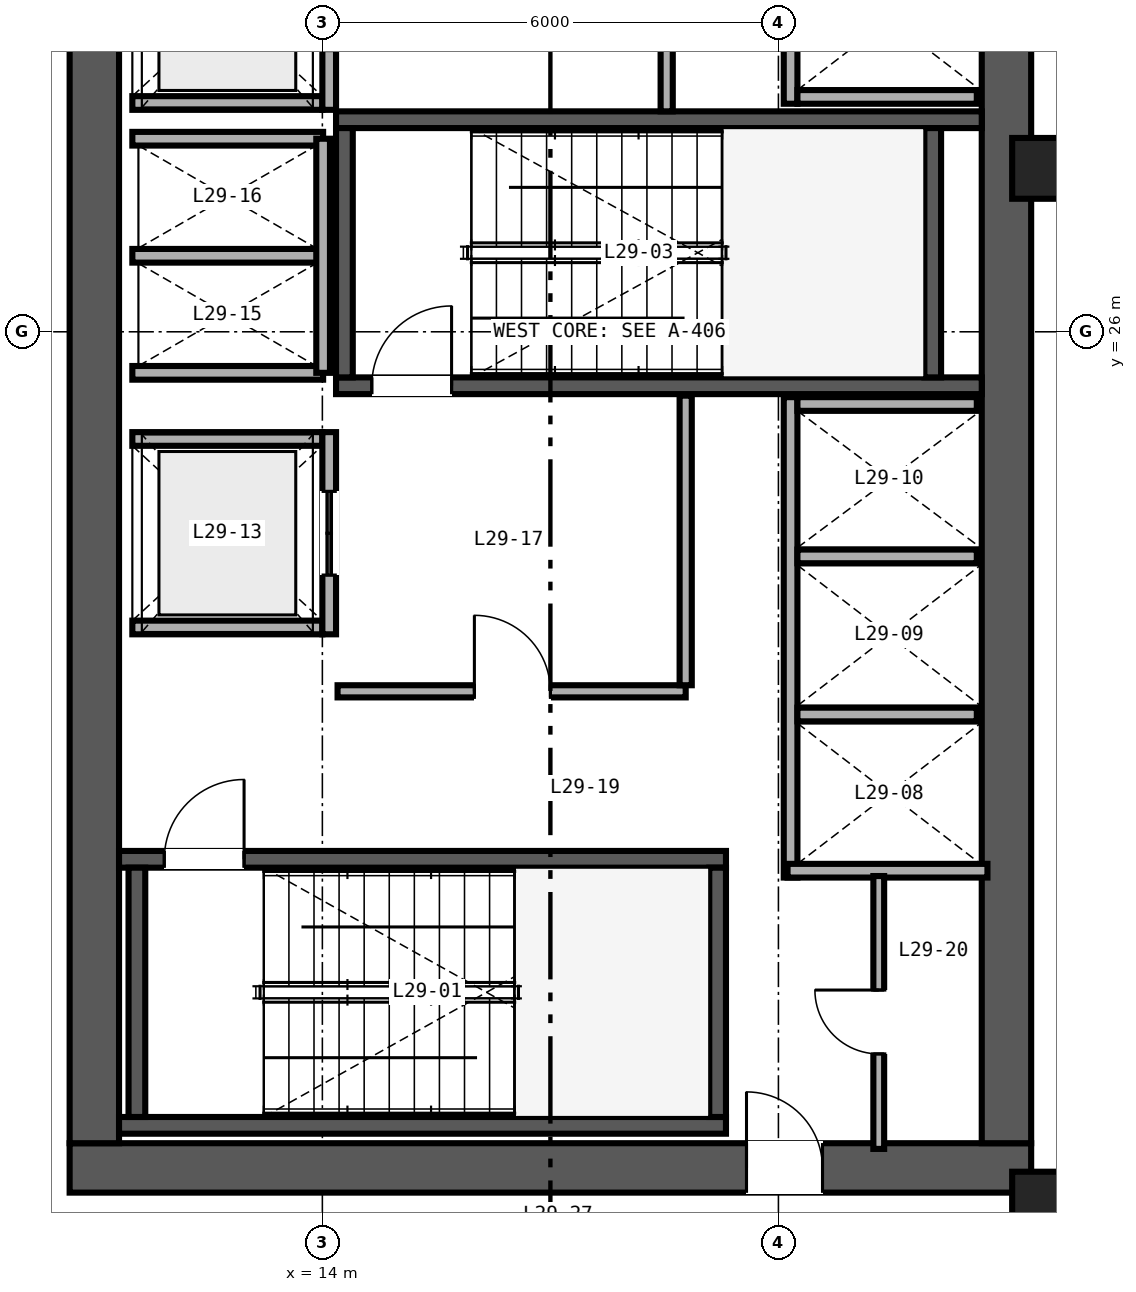
"""IFC4 building model, lengths in metres.
Left out: names, types, materials, properties, quantities, classifications, styles, units other than length and angle.
Written with IfcOpenShell. Run it as: python <this file> out.ifc"""

import sys

from ifc_helpers import new_model, si_unit, direction, frame, frame_2d, origin, origin_2d, place, context, subcontext, project, spatial, rectangle, hollow_rectangle, extrude, source, transform, mapped, element, fill, save


model = new_model("IFC4")
c1 = context("Model", 3, precision=1e-05, world=origin(), true_north=direction((0.0, 1.0)))
c2 = subcontext(c1, "Body", "Model", "MODEL_VIEW")
j1 = project(units=[si_unit("LENGTHUNIT", "METRE"), si_unit("PLANEANGLEUNIT", "RADIAN")], contexts=[c1])
p1 = place(None, origin())
s1 = spatial("IfcSite", under=j1, at=p1, CompositionType="ELEMENT")
p2 = place(p1, origin())
s2 = spatial("IfcBuilding", under=s1, at=p2, CompositionType="ELEMENT")
p3 = place(p2, frame((0.0, 0.0, 118.8)))
s3 = spatial("IfcBuildingStorey", under=s2, at=p3, CompositionType="ELEMENT", Elevation=118.8)
p4 = place(p3, frame((10.675, 15.0, 0.0), z_axis=(0.0, 0.0, 1.0), x_axis=(1.0, 0.0, 0.0)))
e1 = element("IfcWall", 1, at=p4, inside=s3, PredefinedType="SHEAR", context=c2, shape_type="SweptSolid", body=[
    extrude(rectangle(XDim=12.65, YDim=0.65, at=frame_2d((6.325, 0.0))), origin(), (0.0, 0.0, 1.0), 3.36),
])
p5 = place(p4, frame((8.905, 0.0, 0.0)))
e2 = element("IfcOpeningElement", 2, at=p5, cuts=e1, PredefinedType="OPENING", context=c2, shape_type="SweptSolid", body=[
    extrude(rectangle(XDim=1.0, YDim=2.15, at=frame_2d((0.5, 1.075))), frame((0.0, 0.335, 0.0), z_axis=(0.0, -1.0, 0.0), x_axis=(1.0, 0.0, 0.0)), (0.0, 0.0, 1.0), 0.67),
])
for number, where, z_axis, x_axis in (
    (3, (11.0, 15.325, 0.0), (0.0, 0.0, 1.0), (0.0, 1.0, 0.0)),
    (4, (23.0, 15.325, 0.0), (0.0, 0.0, 1.0), (0.0, 1.0, 0.0)),
):
    element("IfcWall", number, at=place(p3, frame(where, z_axis=z_axis, x_axis=x_axis)), inside=s3, PredefinedType="SHEAR", context=c2, shape_type="SweptSolid", body=[
        extrude(rectangle(XDim=21.35, YDim=0.65, at=frame_2d((10.675, 0.0))), origin(), (0.0, 0.0, 1.0), 3.36),
    ])
p6 = place(p3, frame((11.325, 15.56, 0.0), z_axis=(0.0, 0.0, 1.0), x_axis=(1.0, 0.0, 0.0)))
e5 = element("IfcWall", 5, at=p6, inside=s3, PredefinedType="SHEAR", context=c2, shape_type="SweptSolid", body=[
    extrude(rectangle(XDim=7.985, YDim=0.22, at=frame_2d((3.993, 0.0))), origin(), (0.0, 0.0, 1.0), 3.4),
])
p7 = place(p3, frame((11.325, 19.06, 0.0), z_axis=(0.0, 0.0, 1.0), x_axis=(1.0, 0.0, 0.0)))
e6 = element("IfcWall", 6, at=p7, inside=s3, PredefinedType="SHEAR", context=c2, shape_type="SweptSolid", body=[
    extrude(rectangle(XDim=7.985, YDim=0.22, at=frame_2d((3.993, 0.0))), origin(), (0.0, 0.0, 1.0), 3.4),
])
p8 = place(p7, frame((0.595, 0.0, 0.0)))
e7 = element("IfcOpeningElement", 7, at=p8, cuts=e6, PredefinedType="OPENING", context=c2, shape_type="SweptSolid", body=[
    extrude(rectangle(XDim=1.05, YDim=2.15, at=frame_2d((0.525, 1.075))), frame((0.0, 0.12, 0.0), z_axis=(0.0, -1.0, 0.0), x_axis=(1.0, 0.0, 0.0)), (0.0, 0.0, 1.0), 0.24),
])
for number, where, z_axis, x_axis in (
    (8, (11.56, 15.67, 0.0), (0.0, 0.0, 1.0), (0.0, 1.0, 0.0)),
    (9, (19.2, 15.67, 0.0), (0.0, 0.0, 1.0), (0.0, 1.0, 0.0)),
):
    element("IfcWall", number, at=place(p3, frame(where, z_axis=z_axis, x_axis=x_axis)), inside=s3, PredefinedType="SHEAR", context=c2, shape_type="SweptSolid", body=[
        extrude(rectangle(XDim=3.28, YDim=0.22, at=frame_2d((1.64, 0.0))), origin(), (0.0, 0.0, 1.0), 3.4),
    ])
p9 = place(p3, frame((14.18, 25.29, 0.0), z_axis=(0.0, 0.0, 1.0), x_axis=(1.0, 0.0, 0.0)))
e10 = element("IfcWall", 10, at=p9, inside=s3, PredefinedType="SHEAR", context=c2, shape_type="SweptSolid", body=[
    extrude(rectangle(XDim=8.495, YDim=0.22, at=frame_2d((4.248, 0.0))), origin(), (0.0, 0.0, 1.0), 3.4),
])
p10 = place(p9, frame((0.47, 0.0, 0.0)))
e11 = element("IfcOpeningElement", 11, at=p10, cuts=e10, PredefinedType="OPENING", context=c2, shape_type="SweptSolid", body=[
    extrude(rectangle(XDim=1.05, YDim=2.15, at=frame_2d((0.525, 1.075))), frame((0.0, 0.12, 0.0), z_axis=(0.0, -1.0, 0.0), x_axis=(1.0, 0.0, 0.0)), (0.0, 0.0, 1.0), 0.24),
])
p11 = place(p3, frame((14.18, 28.79, 0.0), z_axis=(0.0, 0.0, 1.0), x_axis=(1.0, 0.0, 0.0)))
e12 = element("IfcWall", 12, at=p11, inside=s3, PredefinedType="SHEAR", context=c2, shape_type="SweptSolid", body=[
    extrude(rectangle(XDim=8.495, YDim=0.22, at=frame_2d((4.248, 0.0))), origin(), (0.0, 0.0, 1.0), 3.4),
])
for number, where, z_axis, x_axis in (
    (13, (14.29, 25.4, 0.0), (0.0, 0.0, 1.0), (0.0, 1.0, 0.0)),
    (14, (22.03, 25.4, 0.0), (0.0, 0.0, 1.0), (0.0, 1.0, 0.0)),
):
    element("IfcWall", number, at=place(p3, frame(where, z_axis=z_axis, x_axis=x_axis)), inside=s3, PredefinedType="SHEAR", context=c2, shape_type="SweptSolid", body=[
        extrude(rectangle(XDim=3.28, YDim=0.22, at=frame_2d((1.64, 0.0))), origin(), (0.0, 0.0, 1.0), 3.4),
    ])
m1 = source(origin(), c2, "Body", "SweptSolid", [
    extrude(hollow_rectangle(XDim=0.85, YDim=0.8, WallThickness=0.032, at=origin_2d()), origin(), (0.0, 0.0, 1.0), 3.36),
])
for number, where, z_axis, x_axis in (
    (15, (23.5, 14.55, 0.0), (0.0, 0.0, 1.0), (1.0, 0.0, 0.0)),
    (16, (23.5, 28.15, 0.0), (0.0, 0.0, 1.0), (1.0, 0.0, 0.0)),
):
    element("IfcColumn", number, at=place(p3, frame(where, z_axis=z_axis, x_axis=x_axis)), inside=s3, PredefinedType="COLUMN", context=c2, shape_type="MappedRepresentation", body=[
        mapped(m1, transform((0.0, 0.0, 0.0), scale=1.0)),
    ])
p12 = place(p3, frame((20.16, 18.82, 0.0), z_axis=(0.0, 0.0, 1.0), x_axis=(0.0, 1.0, 0.0)))
e17 = element("IfcWall", 17, at=p12, inside=s3, PredefinedType="SOLIDWALL", context=c2, shape_type="SweptSolid", body=[
    extrude(rectangle(XDim=6.32, YDim=0.18, at=frame_2d((3.16, 0.0))), origin(), (0.0, 0.0, 1.0), 2.36),
])
p13 = place(p3, frame((20.12, 18.91, 0.0), z_axis=(0.0, 0.0, 1.0), x_axis=(1.0, 0.0, 0.0)))
e18 = element("IfcWall", 18, at=p13, inside=s3, PredefinedType="SOLIDWALL", context=c2, shape_type="SweptSolid", body=[
    extrude(rectangle(XDim=2.63, YDim=0.18, at=frame_2d((1.315, 0.0))), origin(), (0.0, 0.0, 1.0), 3.36),
])
p14 = place(p3, frame((20.25, 25.05, 0.0), z_axis=(0.0, 0.0, 1.0), x_axis=(1.0, 0.0, 0.0)))
e19 = element("IfcWall", 19, at=p14, inside=s3, PredefinedType="SOLIDWALL", context=c2, shape_type="SweptSolid", body=[
    extrude(rectangle(XDim=2.36, YDim=0.18, at=frame_2d((1.18, 0.0))), origin(), (0.0, 0.0, 1.0), 3.36),
])
p15 = place(p3, frame((20.25, 20.965, 0.0), z_axis=(0.0, 0.0, 1.0), x_axis=(1.0, 0.0, 0.0)))
e20 = element("IfcWall", 20, at=p15, inside=s3, PredefinedType="SOLIDWALL", context=c2, shape_type="SweptSolid", body=[
    extrude(rectangle(XDim=2.36, YDim=0.18, at=frame_2d((1.18, 0.0))), origin(), (0.0, 0.0, 1.0), 2.36),
])
p16 = place(p3, frame((20.25, 23.045, 0.0), z_axis=(0.0, 0.0, 1.0), x_axis=(1.0, 0.0, 0.0)))
e21 = element("IfcWall", 21, at=p16, inside=s3, PredefinedType="SOLIDWALL", context=c2, shape_type="SweptSolid", body=[
    extrude(rectangle(XDim=2.36, YDim=0.18, at=frame_2d((1.18, 0.0))), origin(), (0.0, 0.0, 1.0), 3.36),
])
p17 = place(p3, frame((20.16, 29.0, 0.0), z_axis=(0.0, 0.0, 1.0), x_axis=(0.0, 1.0, 0.0)))
e22 = element("IfcWall", 22, at=p17, inside=s3, PredefinedType="SOLIDWALL", context=c2, shape_type="SweptSolid", body=[
    extrude(rectangle(XDim=4.29, YDim=0.18, at=frame_2d((2.145, 0.0))), origin(), (0.0, 0.0, 1.0), 3.36),
])
p18 = place(p3, frame((20.25, 29.09, 0.0), z_axis=(0.0, 0.0, 1.0), x_axis=(1.0, 0.0, 0.0)))
e23 = element("IfcWall", 23, at=p18, inside=s3, PredefinedType="SOLIDWALL", context=c2, shape_type="SweptSolid", body=[
    extrude(rectangle(XDim=2.36, YDim=0.18, at=frame_2d((1.18, 0.0))), origin(), (0.0, 0.0, 1.0), 3.36),
])
for number, where, z_axis, x_axis in (
    (24, (11.5, 22.11, 0.0), (0.0, 0.0, 1.0), (1.0, 0.0, 0.0)),
    (25, (11.5, 24.59, 0.0), (0.0, 0.0, 1.0), (1.0, 0.0, 0.0)),
):
    element("IfcWall", number, at=place(p3, frame(where, z_axis=z_axis, x_axis=x_axis)), inside=s3, PredefinedType="SOLIDWALL", context=c2, shape_type="SweptSolid", body=[
        extrude(rectangle(XDim=2.5, YDim=0.18, at=frame_2d((1.25, 0.0))), origin(), (0.0, 0.0, 1.0), 3.36),
    ])
p19 = place(p3, frame((14.09, 22.02, 0.0), z_axis=(0.0, 0.0, 1.0), x_axis=(0.0, 1.0, 0.0)))
e26 = element("IfcWall", 26, at=p19, inside=s3, PredefinedType="SOLIDWALL", context=c2, shape_type="SweptSolid", body=[
    extrude(rectangle(XDim=2.66, YDim=0.18, at=frame_2d((1.33, 0.0))), origin(), (0.0, 0.0, 1.0), 3.36),
])
p20 = place(p19, frame((0.78, 0.0, 0.0)))
e27 = element("IfcOpeningElement", 27, at=p20, cuts=e26, PredefinedType="OPENING", context=c2, shape_type="SweptSolid", body=[
    extrude(rectangle(XDim=1.1, YDim=2.2, at=frame_2d((0.55, 1.1))), frame((0.0, 0.1, 0.0), z_axis=(0.0, -1.0, 0.0), x_axis=(1.0, 0.0, 0.0)), (0.0, 0.0, 1.0), 0.2),
])
p21 = place(p3, frame((11.5, 29.01, 0.0), z_axis=(0.0, 0.0, 1.0), x_axis=(1.0, 0.0, 0.0)))
e28 = element("IfcWall", 28, at=p21, inside=s3, PredefinedType="SOLIDWALL", context=c2, shape_type="SweptSolid", body=[
    extrude(rectangle(XDim=2.5, YDim=0.18, at=frame_2d((1.25, 0.0))), origin(), (0.0, 0.0, 1.0), 3.36),
])
p22 = place(p3, frame((14.09, 28.92, 0.0), z_axis=(0.0, 0.0, 1.0), x_axis=(0.0, 1.0, 0.0)))
e29 = element("IfcWall", 29, at=p22, inside=s3, PredefinedType="SOLIDWALL", context=c2, shape_type="SweptSolid", body=[
    extrude(rectangle(XDim=2.66, YDim=0.18, at=frame_2d((1.33, 0.0))), origin(), (0.0, 0.0, 1.0), 3.36),
])
p23 = place(p22, frame((0.78, 0.0, 0.0)))
e30 = element("IfcOpeningElement", 30, at=p23, cuts=e29, PredefinedType="OPENING", context=c2, shape_type="SweptSolid", body=[
    extrude(rectangle(XDim=1.1, YDim=2.2, at=frame_2d((0.55, 1.1))), frame((0.0, 0.1, 0.0), z_axis=(0.0, -1.0, 0.0), x_axis=(1.0, 0.0, 0.0)), (0.0, 0.0, 1.0), 0.2),
])
for number, where, z_axis, x_axis in (
    (31, (11.5, 25.46, 0.0), (0.0, 0.0, 1.0), (1.0, 0.0, 0.0)),
    (32, (11.5, 27.0, 0.0), (0.0, 0.0, 1.0), (1.0, 0.0, 0.0)),
    (33, (11.5, 28.54, 0.0), (0.0, 0.0, 1.0), (1.0, 0.0, 0.0)),
):
    element("IfcWall", number, at=place(p3, frame(where, z_axis=z_axis, x_axis=x_axis)), inside=s3, PredefinedType="SOLIDWALL", context=c2, shape_type="SweptSolid", body=[
        extrude(rectangle(XDim=2.51, YDim=0.18, at=frame_2d((1.255, 0.0))), origin(), (0.0, 0.0, 1.0), 3.36),
    ])
p24 = place(p3, frame((14.01, 25.46, 0.0), z_axis=(0.0, 0.0, 1.0), x_axis=(0.0, 1.0, 0.0)))
e34 = element("IfcWall", 34, at=p24, inside=s3, PredefinedType="SOLIDWALL", context=c2, shape_type="SweptSolid", body=[
    extrude(rectangle(XDim=3.08, YDim=0.18, at=frame_2d((1.54, 0.0))), origin(), (0.0, 0.0, 1.0), 3.36),
])
p25 = place(p3, frame((14.2, 21.27, 0.0), z_axis=(0.0, 0.0, 1.0), x_axis=(1.0, 0.0, 0.0)))
e35 = element("IfcWall", 35, at=p25, inside=s3, PredefinedType="PARTITIONING", context=c2, shape_type="SweptSolid", body=[
    extrude(rectangle(XDim=4.58, YDim=0.16, at=frame_2d((2.29, 0.0))), origin(), (0.0, 0.0, 1.0), 3.36),
])
p26 = place(p25, frame((1.8, 0.0, 0.0)))
e36 = element("IfcOpeningElement", 36, at=p26, cuts=e35, PredefinedType="OPENING", context=c2, shape_type="SweptSolid", body=[
    extrude(rectangle(XDim=1.0, YDim=2.15, at=frame_2d((0.5, 1.075))), frame((0.0, 0.09, 0.0), z_axis=(0.0, -1.0, 0.0), x_axis=(1.0, 0.0, 0.0)), (0.0, 0.0, 1.0), 0.18),
])
p27 = place(p3, frame((18.78, 21.35, 0.0), z_axis=(0.0, 0.0, 1.0), x_axis=(0.0, 1.0, 0.0)))
e37 = element("IfcWall", 37, at=p27, inside=s3, PredefinedType="PARTITIONING", context=c2, shape_type="SweptSolid", body=[
    extrude(rectangle(XDim=3.81, YDim=0.16, at=frame_2d((1.905, 0.0))), origin(), (0.0, 0.0, 1.0), 3.36),
])
p28 = place(p3, frame((18.53, 28.9, 0.0), z_axis=(0.0, 0.0, 1.0), x_axis=(0.0, 1.0, 0.0)))
e38 = element("IfcWall", 38, at=p28, inside=s3, PredefinedType="PARTITIONING", context=c2, shape_type="SweptSolid", body=[
    extrude(rectangle(XDim=3.9, YDim=0.16, at=frame_2d((1.95, 0.0))), origin(), (0.0, 0.0, 1.0), 3.36),
])
p29 = place(p28, frame((1.5, 0.0, 0.0)))
e39 = element("IfcOpeningElement", 39, at=p29, cuts=e38, PredefinedType="OPENING", context=c2, shape_type="SweptSolid", body=[
    extrude(rectangle(XDim=1.0, YDim=2.15, at=frame_2d((0.5, 1.075))), frame((0.0, 0.09, 0.0), z_axis=(0.0, -1.0, 0.0), x_axis=(1.0, 0.0, 0.0)), (0.0, 0.0, 1.0), 0.18),
])
p30 = place(p3, frame((21.32, 15.25, 0.0), z_axis=(0.0, 0.0, 1.0), x_axis=(0.0, 1.0, 0.0)))
e40 = element("IfcWall", 40, at=p30, inside=s3, PredefinedType="PARTITIONING", context=c2, shape_type="SweptSolid", body=[
    extrude(rectangle(XDim=3.59, YDim=0.142, at=frame_2d((1.795, 0.0))), origin(), (0.0, 0.0, 1.0), 3.36),
])
p31 = place(p30, frame((1.25, 0.0, 0.0)))
e41 = element("IfcOpeningElement", 41, at=p31, cuts=e40, PredefinedType="OPENING", context=c2, shape_type="SweptSolid", body=[
    extrude(rectangle(XDim=0.84, YDim=2.1, at=frame_2d((0.42, 1.05))), frame((0.0, 0.081, 0.0), z_axis=(0.0, -1.0, 0.0), x_axis=(1.0, 0.0, 0.0)), (0.0, 0.0, 1.0), 0.162),
])
m2 = source(origin(), c2, "Body", "SweptSolid", [
    extrude(rectangle(XDim=1.05, YDim=2.15, at=frame_2d((0.525, 1.075))), frame((0.0, 0.025, 0.0), z_axis=(0.0, -1.0, 0.0), x_axis=(1.0, 0.0, 0.0)), (0.0, 0.0, 1.0), 0.05),
])
p32 = place(p8, origin())
e42 = element("IfcDoor", 42, at=p32, inside=s3, OperationType="SINGLE_SWING_RIGHT", PredefinedType="DOOR", context=c2, shape_type="MappedRepresentation", body=[
    mapped(m2, transform((0.0, 0.0, 0.0), scale=1.0)),
])
fill(e7, e42)
p33 = place(p10, origin())
e43 = element("IfcDoor", 43, at=p33, inside=s3, OperationType="SINGLE_SWING_RIGHT", PredefinedType="DOOR", context=c2, shape_type="MappedRepresentation", body=[
    mapped(m2, transform((0.0, 0.0, 0.0), scale=1.0)),
])
fill(e11, e43)
m3 = source(origin(), c2, "Body", "SweptSolid", [
    extrude(rectangle(XDim=1.1, YDim=2.2, at=frame_2d((0.55, 1.1))), frame((0.0, 0.025, 0.0), z_axis=(0.0, -1.0, 0.0), x_axis=(1.0, 0.0, 0.0)), (0.0, 0.0, 1.0), 0.05),
])
p34 = place(p20, origin())
e44 = element("IfcDoor", 44, at=p34, inside=s3, OperationType="DOUBLE_DOOR_SLIDING", PredefinedType="DOOR", context=c2, shape_type="MappedRepresentation", body=[
    mapped(m3, transform((0.0, 0.0, 0.0), scale=1.0)),
])
fill(e27, e44)
m4 = source(origin(), c2, "Body", "SweptSolid", [
    extrude(rectangle(XDim=1.0, YDim=2.15, at=frame_2d((0.5, 1.075))), frame((0.0, 0.025, 0.0), z_axis=(0.0, -1.0, 0.0), x_axis=(1.0, 0.0, 0.0)), (0.0, 0.0, 1.0), 0.05),
])
p35 = place(p26, origin())
e45 = element("IfcDoor", 45, at=p35, inside=s3, OperationType="SINGLE_SWING_LEFT", PredefinedType="DOOR", context=c2, shape_type="MappedRepresentation", body=[
    mapped(m4, transform((0.0, 0.0, 0.0), scale=1.0)),
])
fill(e36, e45)
m5 = source(origin(), c2, "Body", "SweptSolid", [
    extrude(rectangle(XDim=0.84, YDim=2.1, at=frame_2d((0.42, 1.05))), frame((0.0, 0.025, 0.0), z_axis=(0.0, -1.0, 0.0), x_axis=(1.0, 0.0, 0.0)), (0.0, 0.0, 1.0), 0.05),
])
p36 = place(p31, origin())
e46 = element("IfcDoor", 46, at=p36, inside=s3, OperationType="SINGLE_SWING_RIGHT", PredefinedType="DOOR", context=c2, shape_type="MappedRepresentation", body=[
    mapped(m5, transform((0.0, 0.0, 0.0), scale=1.0)),
])
fill(e41, e46)
p37 = place(p5, origin())
e47 = element("IfcDoor", 47, at=p37, inside=s3, OperationType="SINGLE_SWING_LEFT", PredefinedType="DOOR", context=c2, shape_type="MappedRepresentation", body=[
    mapped(m4, transform((0.0, 0.0, 0.0), scale=1.0)),
])
fill(e2, e47)
save(model, sys.argv[1])
